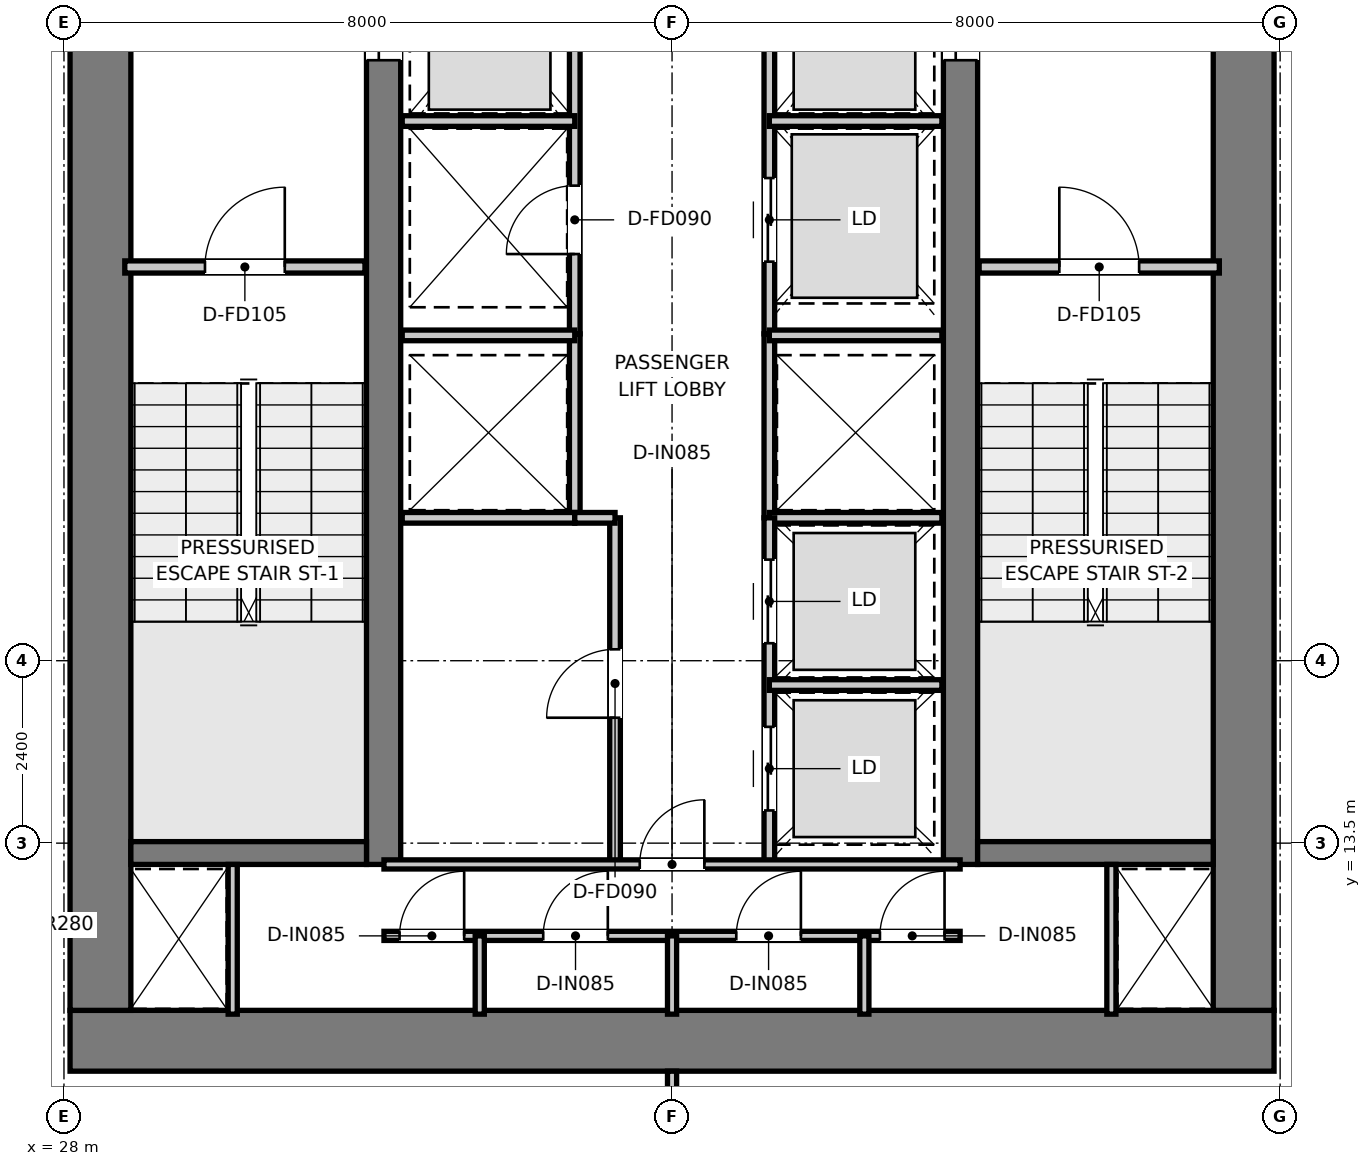
"""IFC4 building model, lengths in metres.
Left out: names, types, materials, properties, quantities, classifications, styles, units other than length and angle.
Written with IfcOpenShell. Run it as: python <this file> out.ifc"""

import sys

from ifc_helpers import new_model, si_unit, direction, frame, frame_2d, origin, place, context, subcontext, project, spatial, rectangle, extrude, element, fill, save


model = new_model("IFC4")
c1 = context("Model", 3, precision=1e-05, world=origin(), true_north=direction((0.0, 1.0)))
c2 = subcontext(c1, "Body", "Model", "MODEL_VIEW")
j1 = project(units=[si_unit("LENGTHUNIT", "METRE"), si_unit("PLANEANGLEUNIT", "RADIAN")], contexts=[c1])
p1 = place(None, origin())
s1 = spatial("IfcSite", under=j1, at=p1, CompositionType="ELEMENT")
p2 = place(p1, origin())
s2 = spatial("IfcBuilding", under=s1, at=p2, CompositionType="ELEMENT")
p3 = place(p2, frame((0.0, 0.0, 219.15)))
s3 = spatial("IfcBuildingStorey", under=s2, at=p3, CompositionType="ELEMENT", Elevation=219.15)
p4 = place(p3, frame((28.08, 10.9, 0.0), z_axis=(0.0, 0.0, 1.0), x_axis=(1.0, 0.0, 0.0)))
e1 = element("IfcWall", 1, at=p4, inside=s3, PredefinedType="SHEAR", context=c2, shape_type="SweptSolid", body=[
    extrude(rectangle(XDim=15.84, YDim=0.8, at=frame_2d((7.92, 0.0))), origin(), (0.0, 0.0, 1.0), 3.95),
])
for number, where, z_axis, x_axis in (
    (2, (28.48, 11.3, 0.0), (0.0, 0.0, 1.0), (0.0, 1.0, 0.0)),
    (3, (43.52, 11.3, 0.0), (0.0, 0.0, 1.0), (0.0, 1.0, 0.0)),
):
    element("IfcWall", number, at=place(p3, frame(where, z_axis=z_axis, x_axis=x_axis)), inside=s3, PredefinedType="SHEAR", context=c2, shape_type="SweptSolid", body=[
        extrude(rectangle(XDim=14.7, YDim=0.8, at=frame_2d((7.35, 0.0))), origin(), (0.0, 0.0, 1.0), 3.95),
    ])
p5 = place(p3, frame((32.205, 13.22, 0.0), z_axis=(0.0, 0.0, 1.0), x_axis=(0.0, 1.0, 0.0)))
e4 = element("IfcWall", 4, at=p5, inside=s3, PredefinedType="SHEAR", context=c2, shape_type="SweptSolid", body=[
    extrude(rectangle(XDim=12.78, YDim=0.45, at=frame_2d((6.39, 0.0))), origin(), (0.0, 0.0, 1.0), 3.95),
])
p6 = place(p5, frame((10.58, 0.0, 0.0)))
e5 = element("IfcOpeningElement", 5, at=p6, cuts=e4, PredefinedType="OPENING", context=c2, shape_type="SweptSolid", body=[
    extrude(rectangle(XDim=1.1, YDim=2.15, at=frame_2d((0.55, 1.075))), frame((0.0, 0.235, 0.0), z_axis=(0.0, -1.0, 0.0), x_axis=(1.0, 0.0, 0.0)), (0.0, 0.0, 1.0), 0.47),
])
p7 = place(p3, frame((39.795, 13.22, 0.0), z_axis=(0.0, 0.0, 1.0), x_axis=(0.0, 1.0, 0.0)))
e6 = element("IfcWall", 6, at=p7, inside=s3, PredefinedType="SHEAR", context=c2, shape_type="SweptSolid", body=[
    extrude(rectangle(XDim=12.78, YDim=0.45, at=frame_2d((6.39, 0.0))), origin(), (0.0, 0.0, 1.0), 3.95),
])
p8 = place(p7, frame((10.58, 0.0, 0.0)))
e7 = element("IfcOpeningElement", 7, at=p8, cuts=e6, PredefinedType="OPENING", context=c2, shape_type="SweptSolid", body=[
    extrude(rectangle(XDim=1.1, YDim=2.15, at=frame_2d((0.55, 1.075))), frame((0.0, 0.235, 0.0), z_axis=(0.0, -1.0, 0.0), x_axis=(1.0, 0.0, 0.0)), (0.0, 0.0, 1.0), 0.47),
])
for number, where, z_axis, x_axis in (
    (8, (28.88, 13.37, 0.0), (0.0, 0.0, 1.0), (1.0, 0.0, 0.0)),
    (9, (40.02, 13.37, 0.0), (0.0, 0.0, 1.0), (1.0, 0.0, 0.0)),
):
    element("IfcWall", number, at=place(p3, frame(where, z_axis=z_axis, x_axis=x_axis)), inside=s3, PredefinedType="SHEAR", context=c2, shape_type="SweptSolid", body=[
        extrude(rectangle(XDim=3.1, YDim=0.3, at=frame_2d((1.55, 0.0))), origin(), (0.0, 0.0, 1.0), 3.95),
    ])
p9 = place(p3, frame((28.8, 21.08, 0.0), z_axis=(0.0, 0.0, 1.0), x_axis=(1.0, 0.0, 0.0)))
e10 = element("IfcWall", 10, at=p9, inside=s3, PredefinedType="PARTITIONING", context=c2, shape_type="SweptSolid", body=[
    extrude(rectangle(XDim=3.16, YDim=0.16, at=frame_2d((1.58, 0.0))), origin(), (0.0, 0.0, 1.0), 3.67),
])
p10 = place(p9, frame((1.055, 0.0, 0.0)))
e11 = element("IfcOpeningElement", 11, at=p10, cuts=e10, PredefinedType="OPENING", context=c2, shape_type="SweptSolid", body=[
    extrude(rectangle(XDim=1.05, YDim=2.1, at=frame_2d((0.525, 1.05))), frame((0.0, 0.09, 0.0), z_axis=(0.0, -1.0, 0.0), x_axis=(1.0, 0.0, 0.0)), (0.0, 0.0, 1.0), 0.18),
])
p11 = place(p3, frame((40.04, 21.08, 0.0), z_axis=(0.0, 0.0, 1.0), x_axis=(1.0, 0.0, 0.0)))
e12 = element("IfcWall", 12, at=p11, inside=s3, PredefinedType="PARTITIONING", context=c2, shape_type="SweptSolid", body=[
    extrude(rectangle(XDim=3.16, YDim=0.16, at=frame_2d((1.58, 0.0))), origin(), (0.0, 0.0, 1.0), 3.67),
])
p12 = place(p11, frame((1.055, 0.0, 0.0)))
e13 = element("IfcOpeningElement", 13, at=p12, cuts=e12, PredefinedType="OPENING", context=c2, shape_type="SweptSolid", body=[
    extrude(rectangle(XDim=1.05, YDim=2.1, at=frame_2d((0.525, 1.05))), frame((0.0, 0.09, 0.0), z_axis=(0.0, -1.0, 0.0), x_axis=(1.0, 0.0, 0.0)), (0.0, 0.0, 1.0), 0.18),
])
p13 = place(p3, frame((34.72, 20.2, 0.0), z_axis=(0.0, 0.0, 1.0), x_axis=(0.0, 1.0, 0.0)))
e14 = element("IfcWall", 14, at=p13, inside=s3, PredefinedType="PARTITIONING", context=c2, shape_type="SweptSolid", body=[
    extrude(rectangle(XDim=5.78, YDim=0.14, at=frame_2d((2.89, 0.0))), origin(), (0.0, 0.0, 1.0), 2.67),
])
p14 = place(p13, frame((1.05, 0.0, 0.0)))
e15 = element("IfcOpeningElement", 15, at=p14, cuts=e14, PredefinedType="OPENING", context=c2, shape_type="SweptSolid", body=[
    extrude(rectangle(XDim=0.9, YDim=2.1, at=frame_2d((0.45, 1.05))), frame((0.0, 0.08, 0.0), z_axis=(0.0, -1.0, 0.0), x_axis=(1.0, 0.0, 0.0)), (0.0, 0.0, 1.0), 0.16),
])
p15 = place(p3, frame((37.28, 20.2, 0.0), z_axis=(0.0, 0.0, 1.0), x_axis=(0.0, 1.0, 0.0)))
e16 = element("IfcWall", 16, at=p15, inside=s3, PredefinedType="PARTITIONING", context=c2, shape_type="SweptSolid", body=[
    extrude(rectangle(XDim=5.78, YDim=0.14, at=frame_2d((2.89, 0.0))), origin(), (0.0, 0.0, 1.0), 2.67),
])
p16 = place(p15, frame((0.95, 0.0, 0.0)))
e17 = element("IfcOpeningElement", 17, at=p16, cuts=e16, PredefinedType="OPENING", context=c2, shape_type="SweptSolid", body=[
    extrude(rectangle(XDim=1.1, YDim=2.15, at=frame_2d((0.55, 1.075))), frame((0.0, 0.08, 0.0), z_axis=(0.0, -1.0, 0.0), x_axis=(1.0, 0.0, 0.0)), (0.0, 0.0, 1.0), 0.16),
])
for number, where, z_axis, x_axis in (
    (18, (32.45, 23.0, 0.0), (0.0, 0.0, 1.0), (1.0, 0.0, 0.0)),
    (19, (37.28, 23.0, 0.0), (0.0, 0.0, 1.0), (1.0, 0.0, 0.0)),
):
    element("IfcWall", number, at=place(p3, frame(where, z_axis=z_axis, x_axis=x_axis)), inside=s3, PredefinedType="PARTITIONING", context=c2, shape_type="SweptSolid", body=[
        extrude(rectangle(XDim=2.27, YDim=0.14, at=frame_2d((1.135, 0.0))), origin(), (0.0, 0.0, 1.0), 2.67),
    ])
for number, where, z_axis, x_axis in (
    (20, (34.72, 17.78, 0.0), (0.0, 0.0, 1.0), (0.0, 1.0, 0.0)),
    (21, (37.28, 17.78, 0.0), (0.0, 0.0, 1.0), (0.0, 1.0, 0.0)),
):
    element("IfcWall", number, at=place(p3, frame(where, z_axis=z_axis, x_axis=x_axis)), inside=s3, PredefinedType="PARTITIONING", context=c2, shape_type="SweptSolid", body=[
        extrude(rectangle(XDim=2.42, YDim=0.14, at=frame_2d((1.21, 0.0))), origin(), (0.0, 0.0, 1.0), 3.67),
    ])
for number, where, z_axis, x_axis in (
    (22, (32.45, 17.78, 0.0), (0.0, 0.0, 1.0), (1.0, 0.0, 0.0)),
    (23, (32.45, 20.18, 0.0), (0.0, 0.0, 1.0), (1.0, 0.0, 0.0)),
    (24, (37.28, 17.78, 0.0), (0.0, 0.0, 1.0), (1.0, 0.0, 0.0)),
    (25, (37.28, 20.18, 0.0), (0.0, 0.0, 1.0), (1.0, 0.0, 0.0)),
):
    element("IfcWall", number, at=place(p3, frame(where, z_axis=z_axis, x_axis=x_axis)), inside=s3, PredefinedType="PARTITIONING", context=c2, shape_type="SweptSolid", body=[
        extrude(rectangle(XDim=2.27, YDim=0.14, at=frame_2d((1.135, 0.0))), origin(), (0.0, 0.0, 1.0), 3.67),
    ])
p17 = place(p3, frame((35.25, 13.22, 0.0), z_axis=(0.0, 0.0, 1.0), x_axis=(0.0, 1.0, 0.0)))
e26 = element("IfcWall", 26, at=p17, inside=s3, PredefinedType="PARTITIONING", context=c2, shape_type="SweptSolid", body=[
    extrude(rectangle(XDim=4.56, YDim=0.14, at=frame_2d((2.28, 0.0))), origin(), (0.0, 0.0, 1.0), 3.67),
])
p18 = place(p17, frame((1.93, 0.0, 0.0)))
e27 = element("IfcOpeningElement", 27, at=p18, cuts=e26, PredefinedType="OPENING", context=c2, shape_type="SweptSolid", body=[
    extrude(rectangle(XDim=0.9, YDim=2.1, at=frame_2d((0.45, 1.05))), frame((0.0, 0.08, 0.0), z_axis=(0.0, -1.0, 0.0), x_axis=(1.0, 0.0, 0.0)), (0.0, 0.0, 1.0), 0.16),
])
p19 = place(p3, frame((34.72, 17.78, 0.0), z_axis=(0.0, 0.0, 1.0), x_axis=(1.0, 0.0, 0.0)))
e28 = element("IfcWall", 28, at=p19, inside=s3, PredefinedType="PARTITIONING", context=c2, shape_type="SweptSolid", body=[
    extrude(rectangle(XDim=0.53, YDim=0.14, at=frame_2d((0.265, 0.0))), origin(), (0.0, 0.0, 1.0), 3.67),
])
p20 = place(p3, frame((37.28, 13.22, 0.0), z_axis=(0.0, 0.0, 1.0), x_axis=(0.0, 1.0, 0.0)))
e29 = element("IfcWall", 29, at=p20, inside=s3, PredefinedType="PARTITIONING", context=c2, shape_type="SweptSolid", body=[
    extrude(rectangle(XDim=4.56, YDim=0.14, at=frame_2d((2.28, 0.0))), origin(), (0.0, 0.0, 1.0), 3.67),
])
p21 = place(p20, frame((0.71, 0.0, 0.0)))
e30 = element("IfcOpeningElement", 30, at=p21, cuts=e29, PredefinedType="OPENING", context=c2, shape_type="SweptSolid", body=[
    extrude(rectangle(XDim=1.1, YDim=2.15, at=frame_2d((0.55, 1.075))), frame((0.0, 0.08, 0.0), z_axis=(0.0, -1.0, 0.0), x_axis=(1.0, 0.0, 0.0)), (0.0, 0.0, 1.0), 0.16),
])
p22 = place(p20, frame((2.91, 0.0, 0.0)))
e31 = element("IfcOpeningElement", 31, at=p22, cuts=e29, PredefinedType="OPENING", context=c2, shape_type="SweptSolid", body=[
    extrude(rectangle(XDim=1.1, YDim=2.15, at=frame_2d((0.55, 1.075))), frame((0.0, 0.08, 0.0), z_axis=(0.0, -1.0, 0.0), x_axis=(1.0, 0.0, 0.0)), (0.0, 0.0, 1.0), 0.16),
])
p23 = place(p3, frame((37.28, 15.58, 0.0), z_axis=(0.0, 0.0, 1.0), x_axis=(1.0, 0.0, 0.0)))
e32 = element("IfcWall", 32, at=p23, inside=s3, PredefinedType="PARTITIONING", context=c2, shape_type="SweptSolid", body=[
    extrude(rectangle(XDim=2.27, YDim=0.14, at=frame_2d((1.135, 0.0))), origin(), (0.0, 0.0, 1.0), 3.67),
])
for number, where, z_axis, x_axis in (
    (33, (30.22, 11.25, 0.0), (0.0, 0.0, 1.0), (0.0, 1.0, 0.0)),
    (34, (41.78, 11.25, 0.0), (0.0, 0.0, 1.0), (0.0, 1.0, 0.0)),
):
    element("IfcWall", number, at=place(p3, frame(where, z_axis=z_axis, x_axis=x_axis)), inside=s3, PredefinedType="PARTITIONING", context=c2, shape_type="SweptSolid", body=[
        extrude(rectangle(XDim=1.97, YDim=0.12, at=frame_2d((0.985, 0.0))), origin(), (0.0, 0.0, 1.0), 3.67),
    ])
p24 = place(p3, frame((32.21, 13.22, 0.0), z_axis=(0.0, 0.0, 1.0), x_axis=(1.0, 0.0, 0.0)))
e35 = element("IfcWall", 35, at=p24, inside=s3, PredefinedType="PARTITIONING", context=c2, shape_type="SweptSolid", body=[
    extrude(rectangle(XDim=7.58, YDim=0.12, at=frame_2d((3.79, 0.0))), origin(), (0.0, 0.0, 1.0), 3.67),
])
p25 = place(p24, frame((3.365, 0.0, 0.0)))
e36 = element("IfcOpeningElement", 36, at=p25, cuts=e35, PredefinedType="OPENING", context=c2, shape_type="SweptSolid", body=[
    extrude(rectangle(XDim=0.85, YDim=2.1, at=frame_2d((0.425, 1.05))), frame((0.0, 0.07, 0.0), z_axis=(0.0, -1.0, 0.0), x_axis=(1.0, 0.0, 0.0)), (0.0, 0.0, 1.0), 0.14),
])
p26 = place(p3, frame((32.21, 12.28, 0.0), z_axis=(0.0, 0.0, 1.0), x_axis=(1.0, 0.0, 0.0)))
e37 = element("IfcWall", 37, at=p26, inside=s3, PredefinedType="PARTITIONING", context=c2, shape_type="SweptSolid", body=[
    extrude(rectangle(XDim=7.58, YDim=0.12, at=frame_2d((3.79, 0.0))), origin(), (0.0, 0.0, 1.0), 3.67),
])
p27 = place(p26, frame((0.205, 0.0, 0.0)))
e38 = element("IfcOpeningElement", 38, at=p27, cuts=e37, PredefinedType="OPENING", context=c2, shape_type="SweptSolid", body=[
    extrude(rectangle(XDim=0.85, YDim=2.1, at=frame_2d((0.425, 1.05))), frame((0.0, 0.07, 0.0), z_axis=(0.0, -1.0, 0.0), x_axis=(1.0, 0.0, 0.0)), (0.0, 0.0, 1.0), 0.14),
])
p28 = place(p26, frame((2.095, 0.0, 0.0)))
e39 = element("IfcOpeningElement", 39, at=p28, cuts=e37, PredefinedType="OPENING", context=c2, shape_type="SweptSolid", body=[
    extrude(rectangle(XDim=0.85, YDim=2.1, at=frame_2d((0.425, 1.05))), frame((0.0, 0.07, 0.0), z_axis=(0.0, -1.0, 0.0), x_axis=(1.0, 0.0, 0.0)), (0.0, 0.0, 1.0), 0.14),
])
p29 = place(p26, frame((4.635, 0.0, 0.0)))
e40 = element("IfcOpeningElement", 40, at=p29, cuts=e37, PredefinedType="OPENING", context=c2, shape_type="SweptSolid", body=[
    extrude(rectangle(XDim=0.85, YDim=2.1, at=frame_2d((0.425, 1.05))), frame((0.0, 0.07, 0.0), z_axis=(0.0, -1.0, 0.0), x_axis=(1.0, 0.0, 0.0)), (0.0, 0.0, 1.0), 0.14),
])
p30 = place(p26, frame((6.525, 0.0, 0.0)))
e41 = element("IfcOpeningElement", 41, at=p30, cuts=e37, PredefinedType="OPENING", context=c2, shape_type="SweptSolid", body=[
    extrude(rectangle(XDim=0.85, YDim=2.1, at=frame_2d((0.425, 1.05))), frame((0.0, 0.07, 0.0), z_axis=(0.0, -1.0, 0.0), x_axis=(1.0, 0.0, 0.0)), (0.0, 0.0, 1.0), 0.14),
])
for number, where, z_axis, x_axis in (
    (42, (33.47, 11.25, 0.0), (0.0, 0.0, 1.0), (0.0, 1.0, 0.0)),
    (43, (36.0, 11.25, 0.0), (0.0, 0.0, 1.0), (0.0, 1.0, 0.0)),
    (44, (38.53, 11.25, 0.0), (0.0, 0.0, 1.0), (0.0, 1.0, 0.0)),
):
    element("IfcWall", number, at=place(p3, frame(where, z_axis=z_axis, x_axis=x_axis)), inside=s3, PredefinedType="PARTITIONING", context=c2, shape_type="SweptSolid", body=[
        extrude(rectangle(XDim=1.03, YDim=0.12, at=frame_2d((0.515, 0.0))), origin(), (0.0, 0.0, 1.0), 3.67),
    ])
p31 = place(p3, frame((36.0, 4.09, 0.0), z_axis=(0.0, 0.0, 1.0), x_axis=(0.0, 1.0, 0.0)))
e45 = element("IfcWall", 45, at=p31, inside=s3, PredefinedType="PARTITIONING", context=c2, shape_type="SweptSolid", body=[
    extrude(rectangle(XDim=6.41, YDim=0.12, at=frame_2d((3.205, 0.0))), origin(), (0.0, 0.0, 1.0), 3.67),
])
p32 = place(p10, origin())
e46 = element("IfcDoor", 46, at=p32, inside=s3, OperationType="SINGLE_SWING_RIGHT", PredefinedType="DOOR", context=c2, shape_type="SweptSolid", body=[
    extrude(rectangle(XDim=1.05, YDim=2.1, at=frame_2d((0.525, 1.05))), frame((0.0, 0.025, 0.0), z_axis=(0.0, -1.0, 0.0), x_axis=(1.0, 0.0, 0.0)), (0.0, 0.0, 1.0), 0.05),
])
fill(e11, e46)
p33 = place(p12, origin())
e47 = element("IfcDoor", 47, at=p33, inside=s3, OperationType="SINGLE_SWING_LEFT", PredefinedType="DOOR", context=c2, shape_type="SweptSolid", body=[
    extrude(rectangle(XDim=1.05, YDim=2.1, at=frame_2d((0.525, 1.05))), frame((0.0, 0.025, 0.0), z_axis=(0.0, -1.0, 0.0), x_axis=(1.0, 0.0, 0.0)), (0.0, 0.0, 1.0), 0.05),
])
fill(e13, e47)
p34 = place(p6, origin())
e48 = element("IfcDoor", 48, at=p34, inside=s3, OperationType="DOUBLE_DOOR_SLIDING", PredefinedType="DOOR", context=c2, shape_type="SweptSolid", body=[
    extrude(rectangle(XDim=1.1, YDim=2.15, at=frame_2d((0.55, 1.075))), frame((0.0, 0.025, 0.0), z_axis=(0.0, -1.0, 0.0), x_axis=(1.0, 0.0, 0.0)), (0.0, 0.0, 1.0), 0.05),
])
fill(e5, e48)
p35 = place(p8, origin())
e49 = element("IfcDoor", 49, at=p35, inside=s3, OperationType="DOUBLE_DOOR_SLIDING", PredefinedType="DOOR", context=c2, shape_type="SweptSolid", body=[
    extrude(rectangle(XDim=1.1, YDim=2.15, at=frame_2d((0.55, 1.075))), frame((0.0, 0.025, 0.0), z_axis=(0.0, -1.0, 0.0), x_axis=(1.0, 0.0, 0.0)), (0.0, 0.0, 1.0), 0.05),
])
fill(e7, e49)
p36 = place(p14, origin())
e50 = element("IfcDoor", 50, at=p36, inside=s3, OperationType="SINGLE_SWING_LEFT", PredefinedType="DOOR", context=c2, shape_type="SweptSolid", body=[
    extrude(rectangle(XDim=0.9, YDim=2.1, at=frame_2d((0.45, 1.05))), frame((0.0, 0.025, 0.0), z_axis=(0.0, -1.0, 0.0), x_axis=(1.0, 0.0, 0.0)), (0.0, 0.0, 1.0), 0.05),
])
fill(e15, e50)
p37 = place(p16, origin())
e51 = element("IfcDoor", 51, at=p37, inside=s3, OperationType="DOUBLE_DOOR_SLIDING", PredefinedType="DOOR", context=c2, shape_type="SweptSolid", body=[
    extrude(rectangle(XDim=1.1, YDim=2.15, at=frame_2d((0.55, 1.075))), frame((0.0, 0.025, 0.0), z_axis=(0.0, -1.0, 0.0), x_axis=(1.0, 0.0, 0.0)), (0.0, 0.0, 1.0), 0.05),
])
fill(e17, e51)
p38 = place(p18, origin())
e52 = element("IfcDoor", 52, at=p38, inside=s3, OperationType="SINGLE_SWING_LEFT", PredefinedType="DOOR", context=c2, shape_type="SweptSolid", body=[
    extrude(rectangle(XDim=0.9, YDim=2.1, at=frame_2d((0.45, 1.05))), frame((0.0, 0.025, 0.0), z_axis=(0.0, -1.0, 0.0), x_axis=(1.0, 0.0, 0.0)), (0.0, 0.0, 1.0), 0.05),
])
fill(e27, e52)
p39 = place(p21, origin())
e53 = element("IfcDoor", 53, at=p39, inside=s3, OperationType="DOUBLE_DOOR_SLIDING", PredefinedType="DOOR", context=c2, shape_type="SweptSolid", body=[
    extrude(rectangle(XDim=1.1, YDim=2.15, at=frame_2d((0.55, 1.075))), frame((0.0, 0.025, 0.0), z_axis=(0.0, -1.0, 0.0), x_axis=(1.0, 0.0, 0.0)), (0.0, 0.0, 1.0), 0.05),
])
fill(e30, e53)
p40 = place(p22, origin())
e54 = element("IfcDoor", 54, at=p40, inside=s3, OperationType="DOUBLE_DOOR_SLIDING", PredefinedType="DOOR", context=c2, shape_type="SweptSolid", body=[
    extrude(rectangle(XDim=1.1, YDim=2.15, at=frame_2d((0.55, 1.075))), frame((0.0, 0.025, 0.0), z_axis=(0.0, -1.0, 0.0), x_axis=(1.0, 0.0, 0.0)), (0.0, 0.0, 1.0), 0.05),
])
fill(e31, e54)
p41 = place(p25, origin())
e55 = element("IfcDoor", 55, at=p41, inside=s3, OperationType="SINGLE_SWING_RIGHT", PredefinedType="DOOR", context=c2, shape_type="SweptSolid", body=[
    extrude(rectangle(XDim=0.85, YDim=2.1, at=frame_2d((0.425, 1.05))), frame((0.0, 0.025, 0.0), z_axis=(0.0, -1.0, 0.0), x_axis=(1.0, 0.0, 0.0)), (0.0, 0.0, 1.0), 0.05),
])
fill(e36, e55)
p42 = place(p27, origin())
e56 = element("IfcDoor", 56, at=p42, inside=s3, OperationType="SINGLE_SWING_RIGHT", PredefinedType="DOOR", context=c2, shape_type="SweptSolid", body=[
    extrude(rectangle(XDim=0.85, YDim=2.1, at=frame_2d((0.425, 1.05))), frame((0.0, 0.025, 0.0), z_axis=(0.0, -1.0, 0.0), x_axis=(1.0, 0.0, 0.0)), (0.0, 0.0, 1.0), 0.05),
])
fill(e38, e56)
p43 = place(p28, origin())
e57 = element("IfcDoor", 57, at=p43, inside=s3, OperationType="SINGLE_SWING_RIGHT", PredefinedType="DOOR", context=c2, shape_type="SweptSolid", body=[
    extrude(rectangle(XDim=0.85, YDim=2.1, at=frame_2d((0.425, 1.05))), frame((0.0, 0.025, 0.0), z_axis=(0.0, -1.0, 0.0), x_axis=(1.0, 0.0, 0.0)), (0.0, 0.0, 1.0), 0.05),
])
fill(e39, e57)
p44 = place(p29, origin())
e58 = element("IfcDoor", 58, at=p44, inside=s3, OperationType="SINGLE_SWING_RIGHT", PredefinedType="DOOR", context=c2, shape_type="SweptSolid", body=[
    extrude(rectangle(XDim=0.85, YDim=2.1, at=frame_2d((0.425, 1.05))), frame((0.0, 0.025, 0.0), z_axis=(0.0, -1.0, 0.0), x_axis=(1.0, 0.0, 0.0)), (0.0, 0.0, 1.0), 0.05),
])
fill(e40, e58)
p45 = place(p30, origin())
e59 = element("IfcDoor", 59, at=p45, inside=s3, OperationType="SINGLE_SWING_RIGHT", PredefinedType="DOOR", context=c2, shape_type="SweptSolid", body=[
    extrude(rectangle(XDim=0.85, YDim=2.1, at=frame_2d((0.425, 1.05))), frame((0.0, 0.025, 0.0), z_axis=(0.0, -1.0, 0.0), x_axis=(1.0, 0.0, 0.0)), (0.0, 0.0, 1.0), 0.05),
])
fill(e41, e59)
save(model, sys.argv[1])
